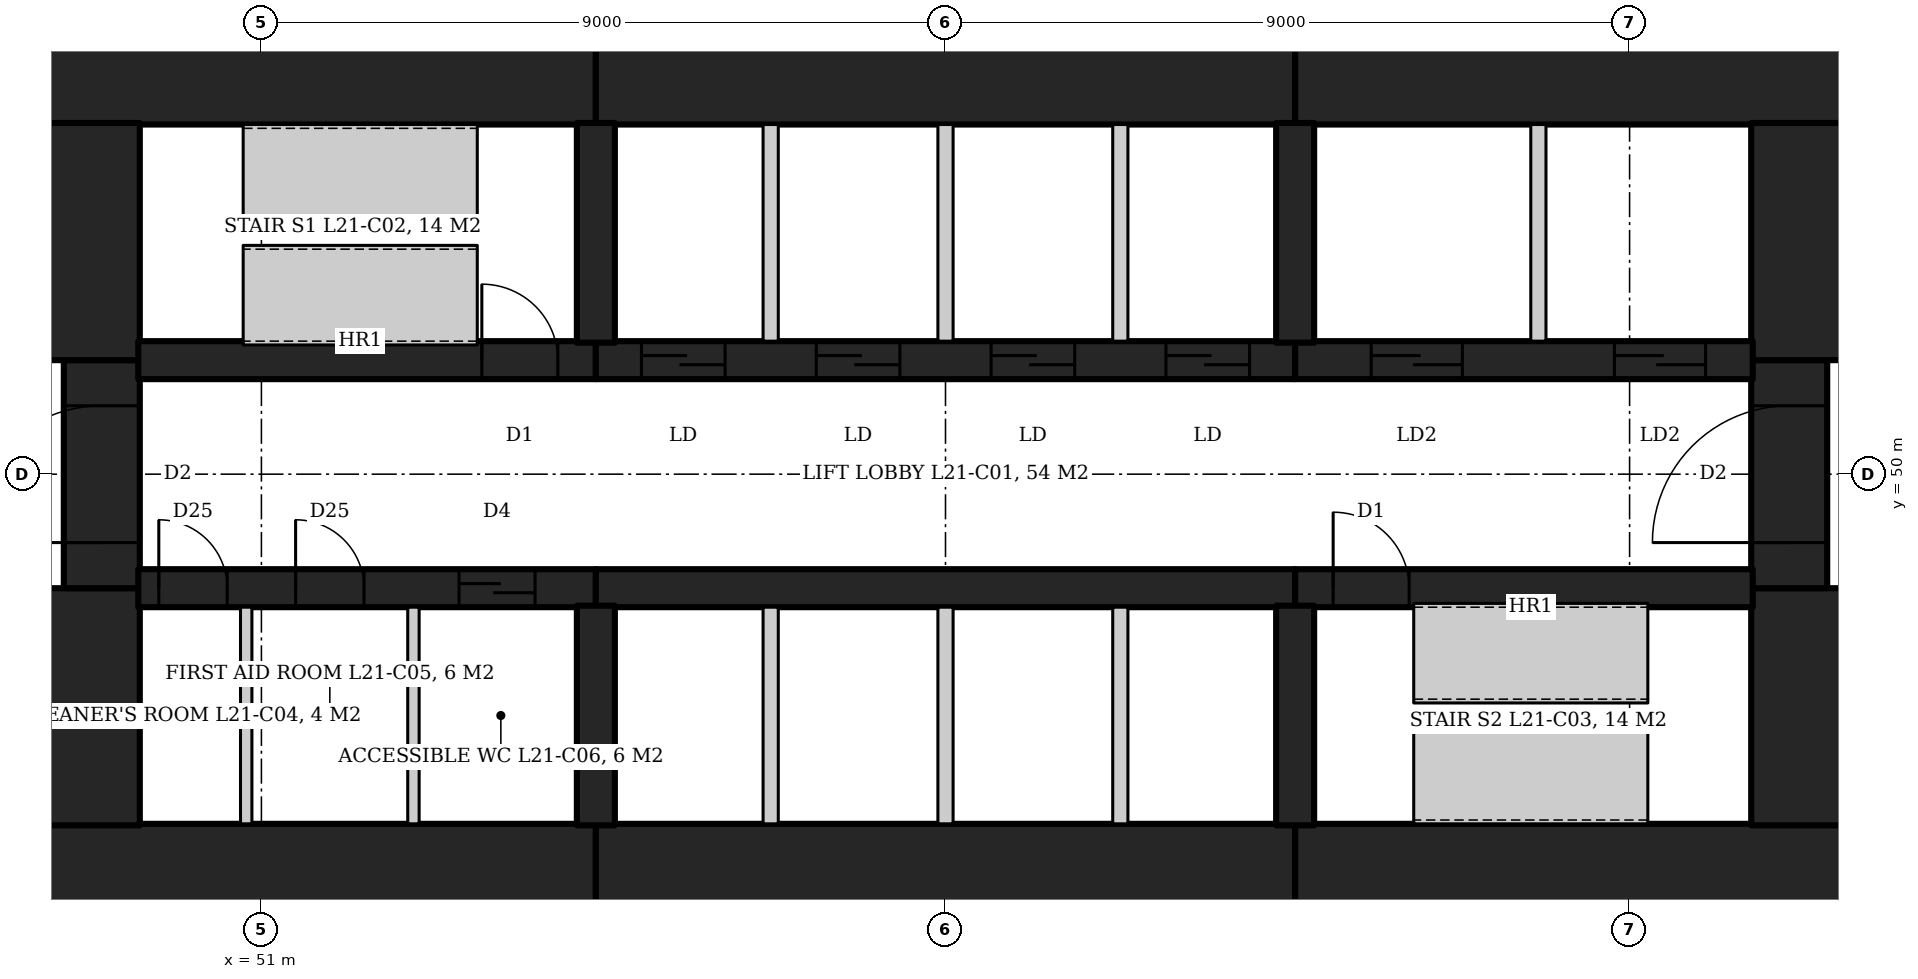
"""IFC4 building model, lengths in metres.
Left out: names, types, materials, properties, quantities, classifications, styles, units other than length and angle.
Written with IfcOpenShell. Run it as: python <this file> out.ifc"""

import sys

from ifc_helpers import new_model, si_unit, direction, frame, frame_2d, origin, place, context, subcontext, project, spatial, rectangle, extrude, element, fill, save


model = new_model("IFC4")
c1 = context("Model", 3, precision=1e-05, world=origin(), true_north=direction((0.0, 1.0)))
c2 = subcontext(c1, "Body", "Model", "MODEL_VIEW")
j1 = project(units=[si_unit("LENGTHUNIT", "METRE"), si_unit("PLANEANGLEUNIT", "RADIAN")], contexts=[c1])
p1 = place(None, origin())
s1 = spatial("IfcSite", under=j1, at=p1, CompositionType="ELEMENT")
p2 = place(p1, origin())
s2 = spatial("IfcBuilding", under=s1, at=p2, CompositionType="ELEMENT")
p3 = place(p2, frame((0.0, 0.0, 93.2)))
s3 = spatial("IfcBuildingStorey", under=s2, at=p3, CompositionType="ELEMENT", Elevation=93.2)
p4 = place(p3, frame((47.6, 55.5, 0.0), z_axis=(0.0, 0.0, 1.0), x_axis=(1.0, 0.0, 0.0)))
e1 = element("IfcWall", 1, at=p4, inside=s3, PredefinedType="SHEAR", context=c2, shape_type="SweptSolid", body=[
    extrude(rectangle(XDim=7.8, YDim=1.8, at=frame_2d((3.9, 0.0))), origin(), (0.0, 0.0, 1.0), 4.2),
])
p5 = place(p3, frame((55.4, 55.5, 0.0), z_axis=(0.0, 0.0, 1.0), x_axis=(1.0, 0.0, 0.0)))
e2 = element("IfcWall", 2, at=p5, inside=s3, PredefinedType="SHEAR", context=c2, shape_type="SweptSolid", body=[
    extrude(rectangle(XDim=9.2, YDim=1.8, at=frame_2d((4.6, 0.0))), origin(), (0.0, 0.0, 1.0), 4.2),
])
for number, where, z_axis, x_axis in (
    (3, (64.6, 55.5, 0.0), (0.0, 0.0, 1.0), (1.0, 0.0, 0.0)),
    (4, (47.6, 44.5, 0.0), (0.0, 0.0, 1.0), (1.0, 0.0, 0.0)),
):
    element("IfcWall", number, at=place(p3, frame(where, z_axis=z_axis, x_axis=x_axis)), inside=s3, PredefinedType="SHEAR", context=c2, shape_type="SweptSolid", body=[
        extrude(rectangle(XDim=7.8, YDim=1.8, at=frame_2d((3.9, 0.0))), origin(), (0.0, 0.0, 1.0), 4.2),
    ])
p6 = place(p3, frame((55.4, 44.5, 0.0), z_axis=(0.0, 0.0, 1.0), x_axis=(1.0, 0.0, 0.0)))
e5 = element("IfcWall", 5, at=p6, inside=s3, PredefinedType="SHEAR", context=c2, shape_type="SweptSolid", body=[
    extrude(rectangle(XDim=9.2, YDim=1.8, at=frame_2d((4.6, 0.0))), origin(), (0.0, 0.0, 1.0), 4.2),
])
p7 = place(p3, frame((64.6, 44.5, 0.0), z_axis=(0.0, 0.0, 1.0), x_axis=(1.0, 0.0, 0.0)))
e6 = element("IfcWall", 6, at=p7, inside=s3, PredefinedType="SHEAR", context=c2, shape_type="SweptSolid", body=[
    extrude(rectangle(XDim=7.8, YDim=1.8, at=frame_2d((3.9, 0.0))), origin(), (0.0, 0.0, 1.0), 4.2),
])
p8 = place(p3, frame((71.5, 45.38, 0.0), z_axis=(0.0, 0.0, 1.0), x_axis=(0.0, 1.0, 0.0)))
e7 = element("IfcWall", 7, at=p8, inside=s3, PredefinedType="SHEAR", context=c2, shape_type="SweptSolid", body=[
    extrude(rectangle(XDim=3.12, YDim=1.8, at=frame_2d((1.56, 0.0))), origin(), (0.0, 0.0, 1.0), 4.2),
])
p9 = place(p3, frame((71.5, 48.5, 0.0), z_axis=(0.0, 0.0, 1.0), x_axis=(0.0, 1.0, 0.0)))
e8 = element("IfcWall", 8, at=p9, inside=s3, PredefinedType="SHEAR", context=c2, shape_type="SweptSolid", body=[
    extrude(rectangle(XDim=3.0, YDim=1.8, at=frame_2d((1.5, 0.0))), origin(), (0.0, 0.0, 1.0), 4.2),
])
p10 = place(p9, frame((0.6, 0.0, 0.0)))
e9 = element("IfcOpeningElement", 9, at=p10, cuts=e8, PredefinedType="OPENING", context=c2, shape_type="SweptSolid", body=[
    extrude(rectangle(XDim=1.8, YDim=2.1, at=frame_2d((0.9, 1.05))), frame((0.0, 0.91, 0.0), z_axis=(0.0, -1.0, 0.0), x_axis=(1.0, 0.0, 0.0)), (0.0, 0.0, 1.0), 1.82),
])
for number, where, z_axis, x_axis in (
    (10, (71.5, 51.5, 0.0), (0.0, 0.0, 1.0), (0.0, 1.0, 0.0)),
    (11, (48.5, 45.38, 0.0), (0.0, 0.0, 1.0), (0.0, 1.0, 0.0)),
):
    element("IfcWall", number, at=place(p3, frame(where, z_axis=z_axis, x_axis=x_axis)), inside=s3, PredefinedType="SHEAR", context=c2, shape_type="SweptSolid", body=[
        extrude(rectangle(XDim=3.12, YDim=1.8, at=frame_2d((1.56, 0.0))), origin(), (0.0, 0.0, 1.0), 4.2),
    ])
p11 = place(p3, frame((48.5, 48.5, 0.0), z_axis=(0.0, 0.0, 1.0), x_axis=(0.0, 1.0, 0.0)))
e12 = element("IfcWall", 12, at=p11, inside=s3, PredefinedType="SHEAR", context=c2, shape_type="SweptSolid", body=[
    extrude(rectangle(XDim=3.0, YDim=1.8, at=frame_2d((1.5, 0.0))), origin(), (0.0, 0.0, 1.0), 4.2),
])
p12 = place(p11, frame((0.6, 0.0, 0.0)))
e13 = element("IfcOpeningElement", 13, at=p12, cuts=e12, PredefinedType="OPENING", context=c2, shape_type="SweptSolid", body=[
    extrude(rectangle(XDim=1.8, YDim=2.1, at=frame_2d((0.9, 1.05))), frame((0.0, 0.91, 0.0), z_axis=(0.0, -1.0, 0.0), x_axis=(1.0, 0.0, 0.0)), (0.0, 0.0, 1.0), 1.82),
])
p13 = place(p3, frame((48.5, 51.5, 0.0), z_axis=(0.0, 0.0, 1.0), x_axis=(0.0, 1.0, 0.0)))
e14 = element("IfcWall", 14, at=p13, inside=s3, PredefinedType="SHEAR", context=c2, shape_type="SweptSolid", body=[
    extrude(rectangle(XDim=3.12, YDim=1.8, at=frame_2d((1.56, 0.0))), origin(), (0.0, 0.0, 1.0), 4.2),
])
p14 = place(p3, frame((49.38, 51.5, 0.0), z_axis=(0.0, 0.0, 1.0), x_axis=(1.0, 0.0, 0.0)))
e15 = element("IfcWall", 15, at=p14, inside=s3, PredefinedType="SHEAR", context=c2, shape_type="SweptSolid", body=[
    extrude(rectangle(XDim=6.02, YDim=0.4, at=frame_2d((3.01, 0.0))), origin(), (0.0, 0.0, 1.0), 4.2),
])
p15 = place(p14, frame((4.52, 0.0, 0.0)))
e16 = element("IfcOpeningElement", 16, at=p15, cuts=e15, PredefinedType="OPENING", context=c2, shape_type="SweptSolid", body=[
    extrude(rectangle(XDim=1.0, YDim=2.1, at=frame_2d((0.5, 1.05))), frame((0.0, 0.21, 0.0), z_axis=(0.0, -1.0, 0.0), x_axis=(1.0, 0.0, 0.0)), (0.0, 0.0, 1.0), 0.42),
])
p16 = place(p3, frame((55.4, 51.5, 0.0), z_axis=(0.0, 0.0, 1.0), x_axis=(1.0, 0.0, 0.0)))
e17 = element("IfcWall", 17, at=p16, inside=s3, PredefinedType="SHEAR", context=c2, shape_type="SweptSolid", body=[
    extrude(rectangle(XDim=9.2, YDim=0.4, at=frame_2d((4.6, 0.0))), origin(), (0.0, 0.0, 1.0), 4.2),
])
p17 = place(p16, frame((0.6, 0.0, 0.0)))
e18 = element("IfcOpeningElement", 18, at=p17, cuts=e17, PredefinedType="OPENING", context=c2, shape_type="SweptSolid", body=[
    extrude(rectangle(XDim=1.1, YDim=2.1, at=frame_2d((0.55, 1.05))), frame((0.0, 0.21, 0.0), z_axis=(0.0, -1.0, 0.0), x_axis=(1.0, 0.0, 0.0)), (0.0, 0.0, 1.0), 0.42),
])
p18 = place(p16, frame((2.9, 0.0, 0.0)))
e19 = element("IfcOpeningElement", 19, at=p18, cuts=e17, PredefinedType="OPENING", context=c2, shape_type="SweptSolid", body=[
    extrude(rectangle(XDim=1.1, YDim=2.1, at=frame_2d((0.55, 1.05))), frame((0.0, 0.21, 0.0), z_axis=(0.0, -1.0, 0.0), x_axis=(1.0, 0.0, 0.0)), (0.0, 0.0, 1.0), 0.42),
])
p19 = place(p16, frame((5.2, 0.0, 0.0)))
e20 = element("IfcOpeningElement", 20, at=p19, cuts=e17, PredefinedType="OPENING", context=c2, shape_type="SweptSolid", body=[
    extrude(rectangle(XDim=1.1, YDim=2.1, at=frame_2d((0.55, 1.05))), frame((0.0, 0.21, 0.0), z_axis=(0.0, -1.0, 0.0), x_axis=(1.0, 0.0, 0.0)), (0.0, 0.0, 1.0), 0.42),
])
p20 = place(p16, frame((7.5, 0.0, 0.0)))
e21 = element("IfcOpeningElement", 21, at=p20, cuts=e17, PredefinedType="OPENING", context=c2, shape_type="SweptSolid", body=[
    extrude(rectangle(XDim=1.1, YDim=2.1, at=frame_2d((0.55, 1.05))), frame((0.0, 0.21, 0.0), z_axis=(0.0, -1.0, 0.0), x_axis=(1.0, 0.0, 0.0)), (0.0, 0.0, 1.0), 0.42),
])
p21 = place(p3, frame((64.6, 51.5, 0.0), z_axis=(0.0, 0.0, 1.0), x_axis=(1.0, 0.0, 0.0)))
e22 = element("IfcWall", 22, at=p21, inside=s3, PredefinedType="SHEAR", context=c2, shape_type="SweptSolid", body=[
    extrude(rectangle(XDim=6.02, YDim=0.4, at=frame_2d((3.01, 0.0))), origin(), (0.0, 0.0, 1.0), 4.2),
])
p22 = place(p21, frame((1.0, 0.0, 0.0)))
e23 = element("IfcOpeningElement", 23, at=p22, cuts=e22, PredefinedType="OPENING", context=c2, shape_type="SweptSolid", body=[
    extrude(rectangle(XDim=1.2, YDim=2.1, at=frame_2d((0.6, 1.05))), frame((0.0, 0.21, 0.0), z_axis=(0.0, -1.0, 0.0), x_axis=(1.0, 0.0, 0.0)), (0.0, 0.0, 1.0), 0.42),
])
p23 = place(p21, frame((4.2, 0.0, 0.0)))
e24 = element("IfcOpeningElement", 24, at=p23, cuts=e22, PredefinedType="OPENING", context=c2, shape_type="SweptSolid", body=[
    extrude(rectangle(XDim=1.2, YDim=2.1, at=frame_2d((0.6, 1.05))), frame((0.0, 0.21, 0.0), z_axis=(0.0, -1.0, 0.0), x_axis=(1.0, 0.0, 0.0)), (0.0, 0.0, 1.0), 0.42),
])
p24 = place(p3, frame((49.38, 48.5, 0.0), z_axis=(0.0, 0.0, 1.0), x_axis=(1.0, 0.0, 0.0)))
e25 = element("IfcWall", 25, at=p24, inside=s3, PredefinedType="SHEAR", context=c2, shape_type="SweptSolid", body=[
    extrude(rectangle(XDim=6.02, YDim=0.4, at=frame_2d((3.01, 0.0))), origin(), (0.0, 0.0, 1.0), 4.2),
])
p25 = place(p24, frame((0.27, 0.0, 0.0)))
e26 = element("IfcOpeningElement", 26, at=p25, cuts=e25, PredefinedType="OPENING", context=c2, shape_type="SweptSolid", body=[
    extrude(rectangle(XDim=0.9, YDim=2.1, at=frame_2d((0.45, 1.05))), frame((0.0, 0.21, 0.0), z_axis=(0.0, -1.0, 0.0), x_axis=(1.0, 0.0, 0.0)), (0.0, 0.0, 1.0), 0.42),
])
p26 = place(p24, frame((2.07, 0.0, 0.0)))
e27 = element("IfcOpeningElement", 27, at=p26, cuts=e25, PredefinedType="OPENING", context=c2, shape_type="SweptSolid", body=[
    extrude(rectangle(XDim=0.9, YDim=2.1, at=frame_2d((0.45, 1.05))), frame((0.0, 0.21, 0.0), z_axis=(0.0, -1.0, 0.0), x_axis=(1.0, 0.0, 0.0)), (0.0, 0.0, 1.0), 0.42),
])
p27 = place(p24, frame((4.22, 0.0, 0.0)))
e28 = element("IfcOpeningElement", 28, at=p27, cuts=e25, PredefinedType="OPENING", context=c2, shape_type="SweptSolid", body=[
    extrude(rectangle(XDim=1.0, YDim=2.1, at=frame_2d((0.5, 1.05))), frame((0.0, 0.21, 0.0), z_axis=(0.0, -1.0, 0.0), x_axis=(1.0, 0.0, 0.0)), (0.0, 0.0, 1.0), 0.42),
])
p28 = place(p3, frame((55.4, 48.5, 0.0), z_axis=(0.0, 0.0, 1.0), x_axis=(1.0, 0.0, 0.0)))
e29 = element("IfcWall", 29, at=p28, inside=s3, PredefinedType="SHEAR", context=c2, shape_type="SweptSolid", body=[
    extrude(rectangle(XDim=9.2, YDim=0.4, at=frame_2d((4.6, 0.0))), origin(), (0.0, 0.0, 1.0), 4.2),
])
p29 = place(p3, frame((64.6, 48.5, 0.0), z_axis=(0.0, 0.0, 1.0), x_axis=(1.0, 0.0, 0.0)))
e30 = element("IfcWall", 30, at=p29, inside=s3, PredefinedType="SHEAR", context=c2, shape_type="SweptSolid", body=[
    extrude(rectangle(XDim=6.02, YDim=0.4, at=frame_2d((3.01, 0.0))), origin(), (0.0, 0.0, 1.0), 4.2),
])
p30 = place(p29, frame((0.5, 0.0, 0.0)))
e31 = element("IfcOpeningElement", 31, at=p30, cuts=e30, PredefinedType="OPENING", context=c2, shape_type="SweptSolid", body=[
    extrude(rectangle(XDim=1.0, YDim=2.1, at=frame_2d((0.5, 1.05))), frame((0.0, 0.21, 0.0), z_axis=(0.0, -1.0, 0.0), x_axis=(1.0, 0.0, 0.0)), (0.0, 0.0, 1.0), 0.42),
])
for number, where, z_axis, x_axis in (
    (32, (55.4, 51.68, 0.0), (0.0, 0.0, 1.0), (0.0, 1.0, 0.0)),
    (33, (64.6, 51.68, 0.0), (0.0, 0.0, 1.0), (0.0, 1.0, 0.0)),
    (34, (55.4, 48.32, 0.0), (0.0, 0.0, 1.0), (0.0, -1.0, 0.0)),
    (35, (64.6, 48.32, 0.0), (0.0, 0.0, 1.0), (0.0, -1.0, 0.0)),
):
    element("IfcWall", number, at=place(p3, frame(where, z_axis=z_axis, x_axis=x_axis)), inside=s3, PredefinedType="SHEAR", context=c2, shape_type="SweptSolid", body=[
        extrude(rectangle(XDim=2.94, YDim=0.4, at=frame_2d((1.47, 0.0))), origin(), (0.0, 0.0, 1.0), 4.2),
    ])
for number, where, z_axis, x_axis in (
    (36, (57.7, 51.7, 0.0), (0.0, 0.0, 1.0), (0.0, 1.0, 0.0)),
    (37, (60.0, 51.7, 0.0), (0.0, 0.0, 1.0), (0.0, 1.0, 0.0)),
    (38, (62.3, 51.7, 0.0), (0.0, 0.0, 1.0), (0.0, 1.0, 0.0)),
    (39, (57.7, 45.4, 0.0), (0.0, 0.0, 1.0), (0.0, 1.0, 0.0)),
    (40, (60.0, 45.4, 0.0), (0.0, 0.0, 1.0), (0.0, 1.0, 0.0)),
    (41, (62.3, 45.4, 0.0), (0.0, 0.0, 1.0), (0.0, 1.0, 0.0)),
    (42, (67.8, 51.7, 0.0), (0.0, 0.0, 1.0), (0.0, 1.0, 0.0)),
):
    element("IfcWall", number, at=place(p3, frame(where, z_axis=z_axis, x_axis=x_axis)), inside=s3, PredefinedType="PARTITIONING", context=c2, shape_type="SweptSolid", body=[
        extrude(rectangle(XDim=2.9, YDim=0.2, at=frame_2d((1.45, 0.0))), origin(), (0.0, 0.0, 1.0), 4.2),
    ])
for number, where, z_axis, x_axis in (
    (43, (50.8, 45.4, 0.0), (0.0, 0.0, 1.0), (0.0, 1.0, 0.0)),
    (44, (53.0, 45.4, 0.0), (0.0, 0.0, 1.0), (0.0, 1.0, 0.0)),
):
    element("IfcWall", number, at=place(p3, frame(where, z_axis=z_axis, x_axis=x_axis)), inside=s3, PredefinedType="PARTITIONING", context=c2, shape_type="SweptSolid", body=[
        extrude(rectangle(XDim=2.9, YDim=0.15, at=frame_2d((1.45, 0.0))), origin(), (0.0, 0.0, 1.0), 4.04),
    ])
p31 = place(p15, origin())
e45 = element("IfcDoor", 45, at=p31, inside=s3, OperationType="SINGLE_SWING_LEFT", PredefinedType="DOOR", context=c2, shape_type="SweptSolid", body=[
    extrude(rectangle(XDim=1.0, YDim=2.1, at=frame_2d((0.5, 1.05))), frame((0.0, 0.025, 0.0), z_axis=(0.0, -1.0, 0.0), x_axis=(1.0, 0.0, 0.0)), (0.0, 0.0, 1.0), 0.05),
])
fill(e16, e45)
p32 = place(p30, origin())
e46 = element("IfcDoor", 46, at=p32, inside=s3, OperationType="SINGLE_SWING_LEFT", PredefinedType="DOOR", context=c2, shape_type="SweptSolid", body=[
    extrude(rectangle(XDim=1.0, YDim=2.1, at=frame_2d((0.5, 1.05))), frame((0.0, 0.025, 0.0), z_axis=(0.0, -1.0, 0.0), x_axis=(1.0, 0.0, 0.0)), (0.0, 0.0, 1.0), 0.05),
])
fill(e31, e46)
p33 = place(p22, origin())
e47 = element("IfcDoor", 47, at=p33, inside=s3, OperationType="SLIDING_TO_LEFT", PredefinedType="DOOR", context=c2, shape_type="SweptSolid", body=[
    extrude(rectangle(XDim=1.2, YDim=2.1, at=frame_2d((0.6, 1.05))), frame((0.0, 0.025, 0.0), z_axis=(0.0, -1.0, 0.0), x_axis=(1.0, 0.0, 0.0)), (0.0, 0.0, 1.0), 0.05),
])
fill(e23, e47)
p34 = place(p23, origin())
e48 = element("IfcDoor", 48, at=p34, inside=s3, OperationType="SLIDING_TO_LEFT", PredefinedType="DOOR", context=c2, shape_type="SweptSolid", body=[
    extrude(rectangle(XDim=1.2, YDim=2.1, at=frame_2d((0.6, 1.05))), frame((0.0, 0.025, 0.0), z_axis=(0.0, -1.0, 0.0), x_axis=(1.0, 0.0, 0.0)), (0.0, 0.0, 1.0), 0.05),
])
fill(e24, e48)
p35 = place(p17, origin())
e49 = element("IfcDoor", 49, at=p35, inside=s3, OperationType="SLIDING_TO_LEFT", PredefinedType="DOOR", context=c2, shape_type="SweptSolid", body=[
    extrude(rectangle(XDim=1.1, YDim=2.1, at=frame_2d((0.55, 1.05))), frame((0.0, 0.025, 0.0), z_axis=(0.0, -1.0, 0.0), x_axis=(1.0, 0.0, 0.0)), (0.0, 0.0, 1.0), 0.05),
])
fill(e18, e49)
p36 = place(p18, origin())
e50 = element("IfcDoor", 50, at=p36, inside=s3, OperationType="SLIDING_TO_LEFT", PredefinedType="DOOR", context=c2, shape_type="SweptSolid", body=[
    extrude(rectangle(XDim=1.1, YDim=2.1, at=frame_2d((0.55, 1.05))), frame((0.0, 0.025, 0.0), z_axis=(0.0, -1.0, 0.0), x_axis=(1.0, 0.0, 0.0)), (0.0, 0.0, 1.0), 0.05),
])
fill(e19, e50)
p37 = place(p19, origin())
e51 = element("IfcDoor", 51, at=p37, inside=s3, OperationType="SLIDING_TO_LEFT", PredefinedType="DOOR", context=c2, shape_type="SweptSolid", body=[
    extrude(rectangle(XDim=1.1, YDim=2.1, at=frame_2d((0.55, 1.05))), frame((0.0, 0.025, 0.0), z_axis=(0.0, -1.0, 0.0), x_axis=(1.0, 0.0, 0.0)), (0.0, 0.0, 1.0), 0.05),
])
fill(e20, e51)
p38 = place(p20, origin())
e52 = element("IfcDoor", 52, at=p38, inside=s3, OperationType="SLIDING_TO_LEFT", PredefinedType="DOOR", context=c2, shape_type="SweptSolid", body=[
    extrude(rectangle(XDim=1.1, YDim=2.1, at=frame_2d((0.55, 1.05))), frame((0.0, 0.025, 0.0), z_axis=(0.0, -1.0, 0.0), x_axis=(1.0, 0.0, 0.0)), (0.0, 0.0, 1.0), 0.05),
])
fill(e21, e52)
p39 = place(p25, origin())
e53 = element("IfcDoor", 53, at=p39, inside=s3, OperationType="SINGLE_SWING_RIGHT", PredefinedType="DOOR", context=c2, shape_type="SweptSolid", body=[
    extrude(rectangle(XDim=0.9, YDim=2.1, at=frame_2d((0.45, 1.05))), frame((0.0, 0.025, 0.0), z_axis=(0.0, -1.0, 0.0), x_axis=(1.0, 0.0, 0.0)), (0.0, 0.0, 1.0), 0.05),
])
fill(e26, e53)
p40 = place(p26, origin())
e54 = element("IfcDoor", 54, at=p40, inside=s3, OperationType="SINGLE_SWING_RIGHT", PredefinedType="DOOR", context=c2, shape_type="SweptSolid", body=[
    extrude(rectangle(XDim=0.9, YDim=2.1, at=frame_2d((0.45, 1.05))), frame((0.0, 0.025, 0.0), z_axis=(0.0, -1.0, 0.0), x_axis=(1.0, 0.0, 0.0)), (0.0, 0.0, 1.0), 0.05),
])
fill(e27, e54)
p41 = place(p27, origin())
e55 = element("IfcDoor", 55, at=p41, inside=s3, OperationType="SLIDING_TO_LEFT", PredefinedType="DOOR", context=c2, shape_type="SweptSolid", body=[
    extrude(rectangle(XDim=1.0, YDim=2.1, at=frame_2d((0.5, 1.05))), frame((0.0, 0.025, 0.0), z_axis=(0.0, -1.0, 0.0), x_axis=(1.0, 0.0, 0.0)), (0.0, 0.0, 1.0), 0.05),
])
fill(e28, e55)
p42 = place(p10, origin())
e56 = element("IfcDoor", 56, at=p42, inside=s3, OperationType="DOUBLE_DOOR_DOUBLE_SWING", PredefinedType="DOOR", context=c2, shape_type="SweptSolid", body=[
    extrude(rectangle(XDim=1.8, YDim=2.1, at=frame_2d((0.9, 1.05))), frame((0.0, 0.025, 0.0), z_axis=(0.0, -1.0, 0.0), x_axis=(1.0, 0.0, 0.0)), (0.0, 0.0, 1.0), 0.05),
])
fill(e9, e56)
p43 = place(p12, origin())
e57 = element("IfcDoor", 57, at=p43, inside=s3, OperationType="DOUBLE_DOOR_DOUBLE_SWING", PredefinedType="DOOR", context=c2, shape_type="SweptSolid", body=[
    extrude(rectangle(XDim=1.8, YDim=2.1, at=frame_2d((0.9, 1.05))), frame((0.0, 0.025, 0.0), z_axis=(0.0, -1.0, 0.0), x_axis=(1.0, 0.0, 0.0)), (0.0, 0.0, 1.0), 0.05),
])
fill(e13, e57)
save(model, sys.argv[1])
